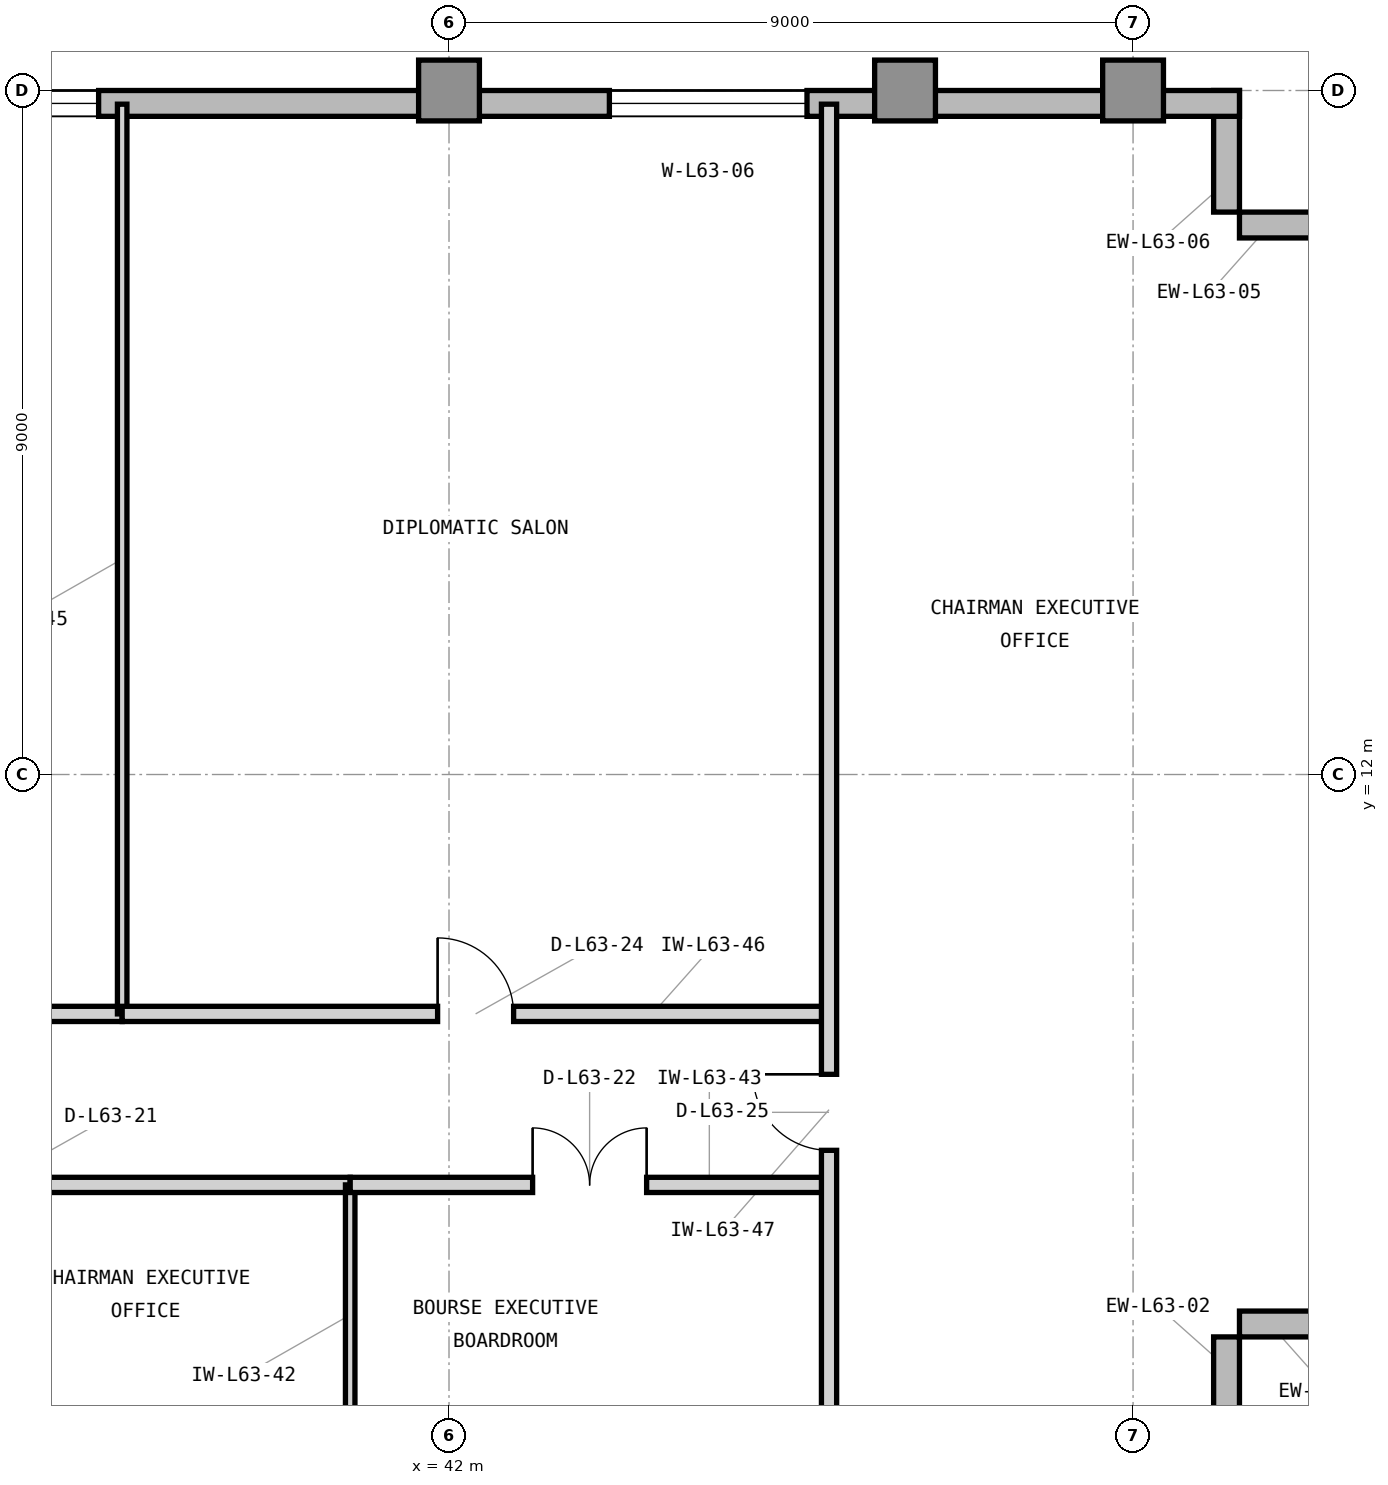
"""IFC4 building model, lengths in metres.
Left out: names, types, materials, properties, quantities, classifications, styles, units other than length and angle.
Written with IfcOpenShell. Run it as: python <this file> out.ifc"""

import sys

from ifc_helpers import new_model, si_unit, direction, frame, frame_2d, origin, origin_2d, place, context, subcontext, project, spatial, rectangle, extrude, element, fill, save


model = new_model("IFC4")
c1 = context("Model", 3, precision=1e-05, world=origin(), true_north=direction((0.0, 1.0)))
c2 = subcontext(c1, "Body", "Model", "MODEL_VIEW")
j1 = project(units=[si_unit("LENGTHUNIT", "METRE"), si_unit("PLANEANGLEUNIT", "RADIAN")], contexts=[c1])
p1 = place(None, origin())
s1 = spatial("IfcSite", under=j1, at=p1, CompositionType="ELEMENT")
p2 = place(p1, origin())
s2 = spatial("IfcBuilding", under=s1, at=p2, CompositionType="ELEMENT")
p3 = place(p2, frame((0.0, 0.0, 258.6)))
s3 = spatial("IfcBuildingStorey", under=s2, at=p3, CompositionType="ELEMENT", Elevation=258.6)
for number, where, z_axis, x_axis in (
    (1, (42.0, 21.0, 0.0), (0.0, 0.0, 1.0), (1.0, 0.0, 0.0)),
    (2, (48.0, 21.0, 0.0), (0.0, 0.0, 1.0), (1.0, 0.0, 0.0)),
    (3, (51.0, 21.0, 0.0), (0.0, 0.0, 1.0), (1.0, 0.0, 0.0)),
):
    element("IfcColumn", number, at=place(p3, frame(where, z_axis=z_axis, x_axis=x_axis)), inside=s3, PredefinedType="COLUMN", context=c2, shape_type="SweptSolid", body=[
        extrude(rectangle(XDim=0.8, YDim=0.8, at=origin_2d()), origin(), (0.0, 0.0, 1.0), 3.9),
    ])
for number, where, z_axis, x_axis in (
    (4, (52.23, 3.0, 0.0), (0.0, 0.0, 1.0), (0.0, 1.0, 0.0)),
    (5, (52.4, 4.77, 0.0), (0.0, 0.0, 1.0), (1.0, 0.0, 0.0)),
    (6, (54.0, 19.23, 0.0), (0.0, 0.0, 1.0), (-1.0, 0.0, 0.0)),
    (7, (52.23, 19.4, 0.0), (0.0, 0.0, 1.0), (0.0, 1.0, 0.0)),
):
    element("IfcWall", number, at=place(p3, frame(where, z_axis=z_axis, x_axis=x_axis)), inside=s3, PredefinedType="STANDARD", context=c2, shape_type="SweptSolid", body=[
        extrude(rectangle(XDim=1.6, YDim=0.34, at=frame_2d((0.8, 0.0))), origin(), (0.0, 0.0, 1.0), 3.715),
    ])
p4 = place(p3, frame((52.4, 20.83, 0.0), z_axis=(0.0, 0.0, 1.0), x_axis=(-1.0, 0.0, 0.0)))
e8 = element("IfcWall", 8, at=p4, inside=s3, PredefinedType="STANDARD", context=c2, shape_type="SweptSolid", body=[
    extrude(rectangle(XDim=32.62, YDim=0.34, at=frame_2d((16.31, 0.0))), origin(), (0.0, 0.0, 1.0), 3.715),
])
p5 = place(p4, frame((5.69, 0.0, 0.8)))
e9 = element("IfcOpeningElement", 9, at=p5, cuts=e8, PredefinedType="OPENING", context=c2, shape_type="SweptSolid", body=[
    extrude(rectangle(XDim=2.6, YDim=2.35, at=frame_2d((1.3, 1.175))), frame((0.0, 0.18, 0.0), z_axis=(0.0, -1.0, 0.0), x_axis=(1.0, 0.0, 0.0)), (0.0, 0.0, 1.0), 0.36),
])
p6 = place(p4, frame((15.01, 0.0, 0.8)))
e10 = element("IfcOpeningElement", 10, at=p6, cuts=e8, PredefinedType="OPENING", context=c2, shape_type="SweptSolid", body=[
    extrude(rectangle(XDim=2.6, YDim=2.35, at=frame_2d((1.3, 1.175))), frame((0.0, 0.18, 0.0), z_axis=(0.0, -1.0, 0.0), x_axis=(1.0, 0.0, 0.0)), (0.0, 0.0, 1.0), 0.36),
])
p7 = place(p4, frame((26.226, 0.0, 0.8)))
e11 = element("IfcOpeningElement", 11, at=p7, cuts=e8, PredefinedType="OPENING", context=c2, shape_type="SweptSolid", body=[
    extrude(rectangle(XDim=1.2, YDim=2.35, at=frame_2d((0.6, 1.175))), frame((0.0, 0.18, 0.0), z_axis=(0.0, -1.0, 0.0), x_axis=(1.0, 0.0, 0.0)), (0.0, 0.0, 1.0), 0.36),
])
p8 = place(p4, frame((22.046, 0.0, 0.8)))
e12 = element("IfcOpeningElement", 12, at=p8, cuts=e8, PredefinedType="OPENING", context=c2, shape_type="SweptSolid", body=[
    extrude(rectangle(XDim=2.6, YDim=2.35, at=frame_2d((1.3, 1.175))), frame((0.0, 0.18, 0.0), z_axis=(0.0, -1.0, 0.0), x_axis=(1.0, 0.0, 0.0)), (0.0, 0.0, 1.0), 0.36),
])
p9 = place(p3, frame((31.2, 6.6, 0.0), z_axis=(0.0, 0.0, 1.0), x_axis=(1.0, 0.0, 0.0)))
e13 = element("IfcWall", 13, at=p9, inside=s3, PredefinedType="PARTITIONING", context=c2, shape_type="SweptSolid", body=[
    extrude(rectangle(XDim=9.5, YDim=0.2, at=frame_2d((4.75, 0.0))), origin(), (0.0, 0.0, 1.0), 3.705),
])
p10 = place(p9, frame((4.25, 0.0, 0.0)))
e14 = element("IfcOpeningElement", 14, at=p10, cuts=e13, PredefinedType="OPENING", context=c2, shape_type="SweptSolid", body=[
    extrude(rectangle(XDim=1.0, YDim=2.15, at=frame_2d((0.5, 1.075))), frame((0.0, 0.11, 0.0), z_axis=(0.0, -1.0, 0.0), x_axis=(1.0, 0.0, 0.0)), (0.0, 0.0, 1.0), 0.22),
])
p11 = place(p3, frame((40.7, 3.18, 0.0), z_axis=(0.0, 0.0, 1.0), x_axis=(0.0, 1.0, 0.0)))
e15 = element("IfcWall", 15, at=p11, inside=s3, PredefinedType="PARTITIONING", context=c2, shape_type="SweptSolid", body=[
    extrude(rectangle(XDim=3.42, YDim=0.125, at=frame_2d((1.71, 0.0))), origin(), (0.0, 0.0, 1.0), 3.705),
])
p12 = place(p3, frame((40.7, 6.6, 0.0), z_axis=(0.0, 0.0, 1.0), x_axis=(1.0, 0.0, 0.0)))
e16 = element("IfcWall", 16, at=p12, inside=s3, PredefinedType="PARTITIONING", context=c2, shape_type="SweptSolid", body=[
    extrude(rectangle(XDim=6.3, YDim=0.2, at=frame_2d((3.15, 0.0))), origin(), (0.0, 0.0, 1.0), 3.705),
])
p13 = place(p12, frame((2.4, 0.0, 0.0)))
e17 = element("IfcOpeningElement", 17, at=p13, cuts=e16, PredefinedType="OPENING", context=c2, shape_type="SweptSolid", body=[
    extrude(rectangle(XDim=1.5, YDim=2.3, at=frame_2d((0.75, 1.15))), frame((0.0, 0.11, 0.0), z_axis=(0.0, -1.0, 0.0), x_axis=(1.0, 0.0, 0.0)), (0.0, 0.0, 1.0), 0.22),
])
p14 = place(p3, frame((31.2, 8.85, 0.0), z_axis=(0.0, 0.0, 1.0), x_axis=(1.0, 0.0, 0.0)))
e18 = element("IfcWall", 18, at=p14, inside=s3, PredefinedType="PARTITIONING", context=c2, shape_type="SweptSolid", body=[
    extrude(rectangle(XDim=6.5, YDim=0.2, at=frame_2d((3.25, 0.0))), origin(), (0.0, 0.0, 1.0), 3.705),
])
p15 = place(p14, frame((2.5, 0.0, 0.0)))
e19 = element("IfcOpeningElement", 19, at=p15, cuts=e18, PredefinedType="OPENING", context=c2, shape_type="SweptSolid", body=[
    extrude(rectangle(XDim=1.5, YDim=2.3, at=frame_2d((0.75, 1.15))), frame((0.0, 0.11, 0.0), z_axis=(0.0, -1.0, 0.0), x_axis=(1.0, 0.0, 0.0)), (0.0, 0.0, 1.0), 0.22),
])
p16 = place(p3, frame((37.7, 8.85, 0.0), z_axis=(0.0, 0.0, 1.0), x_axis=(0.0, 1.0, 0.0)))
e20 = element("IfcWall", 20, at=p16, inside=s3, PredefinedType="PARTITIONING", context=c2, shape_type="SweptSolid", body=[
    extrude(rectangle(XDim=11.97, YDim=0.125, at=frame_2d((5.985, 0.0))), origin(), (0.0, 0.0, 1.0), 3.705),
])
p17 = place(p3, frame((37.7, 8.85, 0.0), z_axis=(0.0, 0.0, 1.0), x_axis=(1.0, 0.0, 0.0)))
e21 = element("IfcWall", 21, at=p17, inside=s3, PredefinedType="PARTITIONING", context=c2, shape_type="SweptSolid", body=[
    extrude(rectangle(XDim=9.3, YDim=0.2, at=frame_2d((4.65, 0.0))), origin(), (0.0, 0.0, 1.0), 3.705),
])
p18 = place(p17, frame((4.15, 0.0, 0.0)))
e22 = element("IfcOpeningElement", 22, at=p18, cuts=e21, PredefinedType="OPENING", context=c2, shape_type="SweptSolid", body=[
    extrude(rectangle(XDim=1.0, YDim=2.15, at=frame_2d((0.5, 1.075))), frame((0.0, 0.11, 0.0), z_axis=(0.0, -1.0, 0.0), x_axis=(1.0, 0.0, 0.0)), (0.0, 0.0, 1.0), 0.22),
])
p19 = place(p3, frame((47.0, 3.18, 0.0), z_axis=(0.0, 0.0, 1.0), x_axis=(0.0, 1.0, 0.0)))
e23 = element("IfcWall", 23, at=p19, inside=s3, PredefinedType="PARTITIONING", context=c2, shape_type="SweptSolid", body=[
    extrude(rectangle(XDim=17.64, YDim=0.2, at=frame_2d((8.82, 0.0))), origin(), (0.0, 0.0, 1.0), 3.705),
])
p20 = place(p19, frame((3.875, 0.0, 0.0)))
e24 = element("IfcOpeningElement", 24, at=p20, cuts=e23, PredefinedType="OPENING", context=c2, shape_type="SweptSolid", body=[
    extrude(rectangle(XDim=1.0, YDim=2.15, at=frame_2d((0.5, 1.075))), frame((0.0, 0.11, 0.0), z_axis=(0.0, -1.0, 0.0), x_axis=(1.0, 0.0, 0.0)), (0.0, 0.0, 1.0), 0.22),
])
p21 = place(p5, origin())
e25 = element("IfcWindow", 25, at=p21, inside=s3, PartitioningType="SINGLE_PANEL", PredefinedType="WINDOW", context=c2, shape_type="SweptSolid", body=[
    extrude(rectangle(XDim=2.6, YDim=2.35, at=frame_2d((1.3, 1.175))), frame((0.0, 0.11, 0.0), z_axis=(0.0, -1.0, 0.0), x_axis=(1.0, 0.0, 0.0)), (0.0, 0.0, 1.0), 0.06),
])
fill(e9, e25)
p22 = place(p6, origin())
e26 = element("IfcWindow", 26, at=p22, inside=s3, PartitioningType="SINGLE_PANEL", PredefinedType="WINDOW", context=c2, shape_type="SweptSolid", body=[
    extrude(rectangle(XDim=2.6, YDim=2.35, at=frame_2d((1.3, 1.175))), frame((0.0, 0.11, 0.0), z_axis=(0.0, -1.0, 0.0), x_axis=(1.0, 0.0, 0.0)), (0.0, 0.0, 1.0), 0.06),
])
fill(e10, e26)
p23 = place(p13, origin())
e27 = element("IfcDoor", 27, at=p23, inside=s3, OperationType="DOUBLE_DOOR_SINGLE_SWING", PredefinedType="DOOR", context=c2, shape_type="SweptSolid", body=[
    extrude(rectangle(XDim=1.5, YDim=2.3, at=frame_2d((0.75, 1.15))), frame((0.0, 0.025, 0.0), z_axis=(0.0, -1.0, 0.0), x_axis=(1.0, 0.0, 0.0)), (0.0, 0.0, 1.0), 0.05),
])
fill(e17, e27)
p24 = place(p18, origin())
e28 = element("IfcDoor", 28, at=p24, inside=s3, OperationType="SINGLE_SWING_LEFT", PredefinedType="DOOR", context=c2, shape_type="SweptSolid", body=[
    extrude(rectangle(XDim=1.0, YDim=2.15, at=frame_2d((0.5, 1.075))), frame((0.0, 0.025, 0.0), z_axis=(0.0, -1.0, 0.0), x_axis=(1.0, 0.0, 0.0)), (0.0, 0.0, 1.0), 0.05),
])
fill(e22, e28)
p25 = place(p20, origin())
e29 = element("IfcDoor", 29, at=p25, inside=s3, OperationType="SINGLE_SWING_RIGHT", PredefinedType="DOOR", context=c2, shape_type="SweptSolid", body=[
    extrude(rectangle(XDim=1.0, YDim=2.15, at=frame_2d((0.5, 1.075))), frame((0.0, 0.025, 0.0), z_axis=(0.0, -1.0, 0.0), x_axis=(1.0, 0.0, 0.0)), (0.0, 0.0, 1.0), 0.05),
])
fill(e24, e29)
save(model, sys.argv[1])
